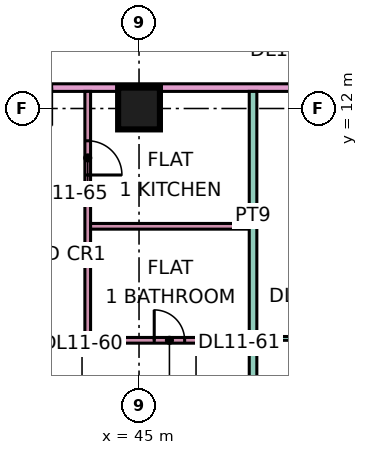
"""IFC4 building model, lengths in metres.
Left out: names, types, materials, properties, quantities, classifications, styles, units other than length and angle.
Written with IfcOpenShell. Run it as: python <this file> out.ifc"""

import sys

from ifc_helpers import new_model, si_unit, direction, frame, frame_2d, origin, origin_2d, place, context, subcontext, project, spatial, rectangle, extrude, element, fill, save


model = new_model("IFC4")
c1 = context("Model", 3, precision=1e-05, world=origin(), true_north=direction((0.0, 1.0)))
c2 = subcontext(c1, "Body", "Model", "MODEL_VIEW")
j1 = project(units=[si_unit("LENGTHUNIT", "METRE"), si_unit("PLANEANGLEUNIT", "RADIAN")], contexts=[c1])
p1 = place(None, origin())
s1 = spatial("IfcSite", under=j1, at=p1, CompositionType="ELEMENT")
p2 = place(p1, origin())
s2 = spatial("IfcBuilding", under=s1, at=p2, CompositionType="ELEMENT")
p3 = place(p2, frame((0.0, 0.0, 56.4)))
s3 = spatial("IfcBuildingStorey", under=s2, at=p3, CompositionType="ELEMENT", Elevation=56.4)
p4 = place(p3, frame((45.0, 12.0, 0.0), z_axis=(0.0, 0.0, 1.0), x_axis=(1.0, 0.0, 0.0)))
e1 = element("IfcColumn", 1, at=p4, inside=s3, PredefinedType="COLUMN", context=c2, shape_type="SweptSolid", body=[
    extrude(rectangle(XDim=1.1, YDim=1.1, at=origin_2d()), origin(), (0.0, 0.0, 1.0), 3.75),
])
p5 = place(p3, frame((40.65, 12.55, 0.0), z_axis=(0.0, 0.0, 1.0), x_axis=(1.0, 0.0, 0.0)))
e2 = element("IfcWall", 2, at=p5, inside=s3, PredefinedType="PARTITIONING", context=c2, shape_type="SweptSolid", body=[
    extrude(rectangle(XDim=31.276, YDim=0.2, at=frame_2d((15.638, 0.0))), origin(), (0.0, 0.0, 1.0), 3.35),
])
p6 = place(p5, frame((8.4, 0.0, 0.0)))
e3 = element("IfcOpeningElement", 3, at=p6, cuts=e2, PredefinedType="OPENING", context=c2, shape_type="SweptSolid", body=[
    extrude(rectangle(XDim=1.0, YDim=2.1, at=frame_2d((0.5, 1.05))), frame((0.0, 0.11, 0.0), z_axis=(0.0, -1.0, 0.0), x_axis=(1.0, 0.0, 0.0)), (0.0, 0.0, 1.0), 0.22),
])
p7 = place(p5, frame((29.7, 0.0, 0.0)))
e4 = element("IfcOpeningElement", 4, at=p7, cuts=e2, PredefinedType="OPENING", context=c2, shape_type="SweptSolid", body=[
    extrude(rectangle(XDim=1.0, YDim=2.1, at=frame_2d((0.5, 1.05))), frame((0.0, 0.11, 0.0), z_axis=(0.0, -1.0, 0.0), x_axis=(1.0, 0.0, 0.0)), (0.0, 0.0, 1.0), 0.22),
])
p8 = place(p5, frame((1.05, 0.0, 0.0)))
e5 = element("IfcOpeningElement", 5, at=p8, cuts=e2, PredefinedType="OPENING", context=c2, shape_type="SweptSolid", body=[
    extrude(rectangle(XDim=1.0, YDim=2.1, at=frame_2d((0.5, 1.05))), frame((0.0, 0.11, 0.0), z_axis=(0.0, -1.0, 0.0), x_axis=(1.0, 0.0, 0.0)), (0.0, 0.0, 1.0), 0.22),
])
p9 = place(p3, frame((43.65, 5.825, 0.0), z_axis=(0.0, 0.0, 1.0), x_axis=(0.0, 1.0, 0.0)))
e6 = element("IfcWall", 6, at=p9, inside=s3, PredefinedType="PARTITIONING", context=c2, shape_type="SweptSolid", body=[
    extrude(rectangle(XDim=6.625, YDim=0.15, at=frame_2d((3.312, 0.0))), origin(), (0.0, 0.0, 1.0), 3.35),
])
p10 = place(p9, frame((4.425, 0.0, 0.0)))
e7 = element("IfcOpeningElement", 7, at=p10, cuts=e6, PredefinedType="OPENING", context=c2, shape_type="SweptSolid", body=[
    extrude(rectangle(XDim=0.9, YDim=2.1, at=frame_2d((0.45, 1.05))), frame((0.0, 0.085, 0.0), z_axis=(0.0, -1.0, 0.0), x_axis=(1.0, 0.0, 0.0)), (0.0, 0.0, 1.0), 0.17),
])
p11 = place(p3, frame((43.725, 5.9, 0.0), z_axis=(0.0, 0.0, 1.0), x_axis=(1.0, 0.0, 0.0)))
e8 = element("IfcWall", 8, at=p11, inside=s3, PredefinedType="PARTITIONING", context=c2, shape_type="SweptSolid", body=[
    extrude(rectangle(XDim=4.175, YDim=0.15, at=frame_2d((2.087, 0.0))), origin(), (0.0, 0.0, 1.0), 3.35),
])
p12 = place(p11, frame((1.675, 0.0, 0.0)))
e9 = element("IfcOpeningElement", 9, at=p12, cuts=e8, PredefinedType="OPENING", context=c2, shape_type="SweptSolid", body=[
    extrude(rectangle(XDim=0.8, YDim=2.1, at=frame_2d((0.4, 1.05))), frame((0.0, 0.085, 0.0), z_axis=(0.0, -1.0, 0.0), x_axis=(1.0, 0.0, 0.0)), (0.0, 0.0, 1.0), 0.17),
])
p13 = place(p3, frame((43.725, 8.9, 0.0), z_axis=(0.0, 0.0, 1.0), x_axis=(1.0, 0.0, 0.0)))
e10 = element("IfcWall", 10, at=p13, inside=s3, PredefinedType="PARTITIONING", context=c2, shape_type="SweptSolid", body=[
    extrude(rectangle(XDim=4.175, YDim=0.15, at=frame_2d((2.087, 0.0))), origin(), (0.0, 0.0, 1.0), 3.35),
])
p14 = place(p3, frame((48.0, 0.0, 0.0), z_axis=(0.0, 0.0, 1.0), x_axis=(0.0, 1.0, 0.0)))
e11 = element("IfcWall", 11, at=p14, inside=s3, PredefinedType="PARTITIONING", context=c2, shape_type="SweptSolid", body=[
    extrude(rectangle(XDim=5.975, YDim=0.2, at=frame_2d((2.988, 0.0))), origin(), (0.0, 0.0, 1.0), 3.35),
])
p15 = place(p3, frame((48.0, 5.9, 0.0), z_axis=(0.0, 0.0, 1.0), x_axis=(0.0, 1.0, 0.0)))
e12 = element("IfcWall", 12, at=p15, inside=s3, PredefinedType="PARTITIONING", context=c2, shape_type="SweptSolid", body=[
    extrude(rectangle(XDim=6.55, YDim=0.2, at=frame_2d((3.275, 0.0))), origin(), (0.0, 0.0, 1.0), 3.35),
])
p16 = place(p3, frame((48.1, 5.95, 0.0), z_axis=(0.0, 0.0, 1.0), x_axis=(1.0, 0.0, 0.0)))
e13 = element("IfcWall", 13, at=p16, inside=s3, PredefinedType="PARTITIONING", context=c2, shape_type="SweptSolid", body=[
    extrude(rectangle(XDim=2.85, YDim=0.1, at=frame_2d((1.425, 0.0))), origin(), (0.0, 0.0, 1.0), 3.35),
])
p17 = place(p16, frame((0.95, 0.0, 0.0)))
e14 = element("IfcOpeningElement", 14, at=p17, cuts=e13, PredefinedType="OPENING", context=c2, shape_type="SweptSolid", body=[
    extrude(rectangle(XDim=0.9, YDim=2.1, at=frame_2d((0.45, 1.05))), frame((0.0, 0.06, 0.0), z_axis=(0.0, -1.0, 0.0), x_axis=(1.0, 0.0, 0.0)), (0.0, 0.0, 1.0), 0.12),
])
p18 = place(p12, origin())
e15 = element("IfcDoor", 15, at=p18, inside=s3, OperationType="SINGLE_SWING_LEFT", PredefinedType="DOOR", context=c2, shape_type="SweptSolid", body=[
    extrude(rectangle(XDim=0.8, YDim=2.1, at=frame_2d((0.4, 1.05))), frame((0.0, 0.025, 0.0), z_axis=(0.0, -1.0, 0.0), x_axis=(1.0, 0.0, 0.0)), (0.0, 0.0, 1.0), 0.05),
])
fill(e9, e15)
p19 = place(p10, frame((0.9, 0.0, 0.0), z_axis=(0.0, 0.0, 1.0), x_axis=(-1.0, 0.0, 0.0)))
e16 = element("IfcDoor", 16, at=p19, inside=s3, OperationType="SINGLE_SWING_LEFT", PredefinedType="DOOR", context=c2, shape_type="SweptSolid", body=[
    extrude(rectangle(XDim=0.9, YDim=2.1, at=frame_2d((0.45, 1.05))), frame((0.0, 0.025, 0.0), z_axis=(0.0, -1.0, 0.0), x_axis=(1.0, 0.0, 0.0)), (0.0, 0.0, 1.0), 0.05),
])
fill(e7, e16)
save(model, sys.argv[1])
